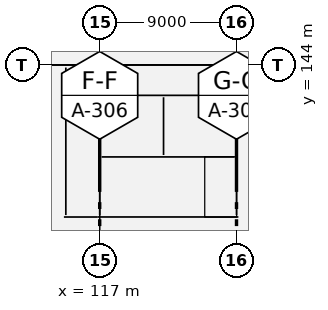
"""IFC4 building model, lengths in metres.
Left out: names, types, materials, properties, quantities, classifications, styles, units other than length and angle.
Written with IfcOpenShell. Run it as: python <this file> out.ifc"""

import sys

from ifc_helpers import new_model, si_unit, direction, frame, frame_2d, origin, origin_2d, place, context, subcontext, project, spatial, rectangle, extrude, element, fill, save


model = new_model("IFC4")
c1 = context("Model", 3, precision=1e-05, world=origin(), true_north=direction((0.0, 1.0)))
c2 = subcontext(c1, "Body", "Model", "MODEL_VIEW")
j1 = project(units=[si_unit("LENGTHUNIT", "METRE"), si_unit("PLANEANGLEUNIT", "RADIAN")], contexts=[c1])
p1 = place(None, origin())
s1 = spatial("IfcSite", under=j1, at=p1, CompositionType="ELEMENT")
p2 = place(p1, origin())
s2 = spatial("IfcBuilding", under=s1, at=p2, CompositionType="ELEMENT")
p3 = place(p2, origin())
s3 = spatial("IfcBuildingStorey", under=s2, at=p3, CompositionType="ELEMENT", Elevation=0.0)
for number, where, z_axis, x_axis in (
    (1, (117.0, 144.0, -0.5), (0.0, 0.0, 1.0), (1.0, 0.0, 0.0)),
    (2, (126.0, 144.0, -0.5), (0.0, 0.0, 1.0), (1.0, 0.0, 0.0)),
):
    element("IfcColumn", number, at=place(p3, frame(where, z_axis=z_axis, x_axis=x_axis)), inside=s3, PredefinedType="COLUMN", context=c2, shape_type="SweptSolid", body=[
        extrude(rectangle(XDim=0.8, YDim=0.7, at=origin_2d()), origin(), (0.0, 0.0, 1.0), 6.8),
    ])
p4 = place(p3, frame((108.4, 144.0, 0.0), z_axis=(0.0, 0.0, 1.0), x_axis=(1.0, 0.0, 0.0)))
e3 = element("IfcWall", 3, at=p4, inside=s3, PredefinedType="SOLIDWALL", context=c2, shape_type="SweptSolid", body=[
    extrude(rectangle(XDim=8.2, YDim=0.34, at=frame_2d((4.1, 0.0))), origin(), (0.0, 0.0, 1.0), 5.12),
])
p5 = place(p4, frame((2.9, 0.0, 0.0)))
e4 = element("IfcOpeningElement", 4, at=p5, cuts=e3, PredefinedType="OPENING", context=c2, shape_type="SweptSolid", body=[
    extrude(rectangle(XDim=2.4, YDim=3.1, at=frame_2d((1.2, 1.55))), frame((0.0, 0.18, 0.0), z_axis=(0.0, -1.0, 0.0), x_axis=(1.0, 0.0, 0.0)), (0.0, 0.0, 1.0), 0.36),
])
p6 = place(p4, frame((6.7, 0.0, 0.0)))
e5 = element("IfcOpeningElement", 5, at=p6, cuts=e3, PredefinedType="OPENING", context=c2, shape_type="SweptSolid", body=[
    extrude(rectangle(XDim=1.2, YDim=2.25, at=frame_2d((0.6, 1.125))), frame((0.0, 0.18, 0.0), z_axis=(0.0, -1.0, 0.0), x_axis=(1.0, 0.0, 0.0)), (0.0, 0.0, 1.0), 0.36),
])
p7 = place(p3, frame((117.4, 144.0, 0.0), z_axis=(0.0, 0.0, 1.0), x_axis=(1.0, 0.0, 0.0)))
e6 = element("IfcWall", 6, at=p7, inside=s3, PredefinedType="SOLIDWALL", context=c2, shape_type="SweptSolid", body=[
    extrude(rectangle(XDim=8.2, YDim=0.34, at=frame_2d((4.1, 0.0))), origin(), (0.0, 0.0, 1.0), 5.12),
])
p8 = place(p7, frame((1.533, 0.0, 0.9)))
e7 = element("IfcOpeningElement", 7, at=p8, cuts=e6, PredefinedType="OPENING", context=c2, shape_type="SweptSolid", body=[
    extrude(rectangle(XDim=2.4, YDim=3.5, at=frame_2d((1.2, 1.75))), frame((0.0, 0.18, 0.0), z_axis=(0.0, -1.0, 0.0), x_axis=(1.0, 0.0, 0.0)), (0.0, 0.0, 1.0), 0.36),
])
p9 = place(p7, frame((4.267, 0.0, 0.9)))
e8 = element("IfcOpeningElement", 8, at=p9, cuts=e6, PredefinedType="OPENING", context=c2, shape_type="SweptSolid", body=[
    extrude(rectangle(XDim=2.4, YDim=3.5, at=frame_2d((1.2, 1.75))), frame((0.0, 0.18, 0.0), z_axis=(0.0, -1.0, 0.0), x_axis=(1.0, 0.0, 0.0)), (0.0, 0.0, 1.0), 0.36),
])
p10 = place(p3, frame((126.4, 144.0, 0.0), z_axis=(0.0, 0.0, 1.0), x_axis=(1.0, 0.0, 0.0)))
e9 = element("IfcWall", 9, at=p10, inside=s3, PredefinedType="SOLIDWALL", context=c2, shape_type="SweptSolid", body=[
    extrude(rectangle(XDim=8.2, YDim=0.34, at=frame_2d((4.1, 0.0))), origin(), (0.0, 0.0, 1.0), 5.12),
])
p11 = place(p10, frame((2.9, 0.0, 0.0)))
e10 = element("IfcOpeningElement", 10, at=p11, cuts=e9, PredefinedType="OPENING", context=c2, shape_type="SweptSolid", body=[
    extrude(rectangle(XDim=2.4, YDim=3.1, at=frame_2d((1.2, 1.55))), frame((0.0, 0.18, 0.0), z_axis=(0.0, -1.0, 0.0), x_axis=(1.0, 0.0, 0.0)), (0.0, 0.0, 1.0), 0.36),
])
for number, where, z_axis, x_axis in (
    (11, (116.875, 134.0, -0.5), (0.0, 0.0, 1.0), (1.0, 0.0, 0.0)),
    (12, (116.875, 142.0, -0.5), (0.0, 0.0, 1.0), (1.0, 0.0, 0.0)),
):
    element("IfcWall", number, at=place(p3, frame(where, z_axis=z_axis, x_axis=x_axis)), inside=s3, PredefinedType="SOLIDWALL", context=c2, shape_type="SweptSolid", body=[
        extrude(rectangle(XDim=9.25, YDim=0.25, at=frame_2d((4.625, 0.0))), origin(), (0.0, 0.0, 1.0), 6.8),
    ])
p12 = place(p3, frame((117.0, 134.125, -0.5), z_axis=(0.0, 0.0, 1.0), x_axis=(0.0, 1.0, 0.0)))
e13 = element("IfcWall", 13, at=p12, inside=s3, PredefinedType="SOLIDWALL", context=c2, shape_type="SweptSolid", body=[
    extrude(rectangle(XDim=7.75, YDim=0.25, at=frame_2d((3.875, 0.0))), origin(), (0.0, 0.0, 1.0), 6.8),
])
p13 = place(p12, frame((1.15, 0.0, 0.5)))
e14 = element("IfcOpeningElement", 14, at=p13, cuts=e13, PredefinedType="OPENING", context=c2, shape_type="SweptSolid", body=[
    extrude(rectangle(XDim=1.2, YDim=2.2, at=frame_2d((0.6, 1.1))), frame((0.0, 0.135, 0.0), z_axis=(0.0, -1.0, 0.0), x_axis=(1.0, 0.0, 0.0)), (0.0, 0.0, 1.0), 0.27),
])
p14 = place(p3, frame((126.0, 134.125, -0.5), z_axis=(0.0, 0.0, 1.0), x_axis=(0.0, 1.0, 0.0)))
e15 = element("IfcWall", 15, at=p14, inside=s3, PredefinedType="SOLIDWALL", context=c2, shape_type="SweptSolid", body=[
    extrude(rectangle(XDim=7.75, YDim=0.25, at=frame_2d((3.875, 0.0))), origin(), (0.0, 0.0, 1.0), 6.8),
])
p15 = place(p14, frame((4.9, 0.0, 0.5)))
e16 = element("IfcOpeningElement", 16, at=p15, cuts=e15, PredefinedType="OPENING", context=c2, shape_type="SweptSolid", body=[
    extrude(rectangle(XDim=1.6, YDim=2.2, at=frame_2d((0.8, 1.1))), frame((0.0, 0.135, 0.0), z_axis=(0.0, -1.0, 0.0), x_axis=(1.0, 0.0, 0.0)), (0.0, 0.0, 1.0), 0.27),
])
p16 = place(p3, frame((117.125, 137.95, -0.5), z_axis=(0.0, 0.0, 1.0), x_axis=(1.0, 0.0, 0.0)))
e17 = element("IfcWall", 17, at=p16, inside=s3, PredefinedType="SOLIDWALL", context=c2, shape_type="SweptSolid", body=[
    extrude(rectangle(XDim=8.75, YDim=0.25, at=frame_2d((4.375, 0.0))), origin(), (0.0, 0.0, 1.0), 6.8),
])
p17 = place(p3, frame((121.2, 138.075, -0.5), z_axis=(0.0, 0.0, 1.0), x_axis=(0.0, 1.0, 0.0)))
e18 = element("IfcWall", 18, at=p17, inside=s3, PredefinedType="SOLIDWALL", context=c2, shape_type="SweptSolid", body=[
    extrude(rectangle(XDim=3.8, YDim=0.25, at=frame_2d((1.9, 0.0))), origin(), (0.0, 0.0, 1.0), 6.8),
])
p18 = place(p17, frame((1.35, 0.0, 0.5)))
e19 = element("IfcOpeningElement", 19, at=p18, cuts=e18, PredefinedType="OPENING", context=c2, shape_type="SweptSolid", body=[
    extrude(rectangle(XDim=1.1, YDim=2.2, at=frame_2d((0.55, 1.1))), frame((0.0, 0.135, 0.0), z_axis=(0.0, -1.0, 0.0), x_axis=(1.0, 0.0, 0.0)), (0.0, 0.0, 1.0), 0.27),
])
p19 = place(p3, frame((114.772, 134.125, 0.0), z_axis=(0.0, 0.0, 1.0), x_axis=(0.0, 1.0, 0.0)))
e20 = element("IfcWall", 20, at=p19, inside=s3, PredefinedType="STANDARD", context=c2, shape_type="SweptSolid", body=[
    extrude(rectangle(XDim=9.705, YDim=0.255, at=frame_2d((4.853, 0.0))), origin(), (0.0, 0.0, 1.0), 5.95),
])
p20 = place(p3, frame((117.002, 142.125, 0.0), z_axis=(0.0, 0.0, 1.0), x_axis=(0.0, 1.0, 0.0)))
e21 = element("IfcWall", 21, at=p20, inside=s3, PredefinedType="STANDARD", context=c2, shape_type="SweptSolid", body=[
    extrude(rectangle(XDim=1.525, YDim=0.255, at=frame_2d((0.762, 0.0))), origin(), (0.0, 0.0, 1.0), 4.97),
])
p21 = place(p3, frame((114.645, 133.998, 0.0), z_axis=(0.0, 0.0, 1.0), x_axis=(1.0, 0.0, 0.0)))
e22 = element("IfcWall", 22, at=p21, inside=s3, PredefinedType="STANDARD", context=c2, shape_type="SweptSolid", body=[
    extrude(rectangle(XDim=2.23, YDim=0.255, at=frame_2d((1.115, 0.0))), origin(), (0.0, 0.0, 1.0), 5.95),
])
p22 = place(p8, origin())
e23 = element("IfcWindow", 23, at=p22, inside=s3, PartitioningType="TRIPLE_PANEL_VERTICAL", PredefinedType="WINDOW", context=c2, shape_type="SweptSolid", body=[
    extrude(rectangle(XDim=2.4, YDim=3.5, at=frame_2d((1.2, 1.75))), frame((0.0, 0.03, 0.0), z_axis=(0.0, -1.0, 0.0), x_axis=(1.0, 0.0, 0.0)), (0.0, 0.0, 1.0), 0.06),
])
fill(e7, e23)
p23 = place(p9, origin())
e24 = element("IfcWindow", 24, at=p23, inside=s3, PartitioningType="TRIPLE_PANEL_VERTICAL", PredefinedType="WINDOW", context=c2, shape_type="SweptSolid", body=[
    extrude(rectangle(XDim=2.4, YDim=3.5, at=frame_2d((1.2, 1.75))), frame((0.0, 0.03, 0.0), z_axis=(0.0, -1.0, 0.0), x_axis=(1.0, 0.0, 0.0)), (0.0, 0.0, 1.0), 0.06),
])
fill(e8, e24)
p24 = place(p18, origin())
e25 = element("IfcDoor", 25, at=p24, inside=s3, OperationType="SLIDING_TO_LEFT", PredefinedType="DOOR", context=c2, shape_type="SweptSolid", body=[
    extrude(rectangle(XDim=1.1, YDim=2.2, at=frame_2d((0.55, 1.1))), frame((0.0, 0.025, 0.0), z_axis=(0.0, -1.0, 0.0), x_axis=(1.0, 0.0, 0.0)), (0.0, 0.0, 1.0), 0.05),
])
fill(e19, e25)
p25 = place(p13, origin())
e26 = element("IfcDoor", 26, at=p25, inside=s3, OperationType="SINGLE_SWING_LEFT", PredefinedType="DOOR", context=c2, shape_type="SweptSolid", body=[
    extrude(rectangle(XDim=1.2, YDim=2.2, at=frame_2d((0.6, 1.1))), frame((0.0, 0.025, 0.0), z_axis=(0.0, -1.0, 0.0), x_axis=(1.0, 0.0, 0.0)), (0.0, 0.0, 1.0), 0.05),
])
fill(e14, e26)
p26 = place(p15, origin())
e27 = element("IfcDoor", 27, at=p26, inside=s3, OperationType="SINGLE_SWING_RIGHT", PredefinedType="DOOR", context=c2, shape_type="SweptSolid", body=[
    extrude(rectangle(XDim=1.6, YDim=2.2, at=frame_2d((0.8, 1.1))), frame((0.0, 0.025, 0.0), z_axis=(0.0, -1.0, 0.0), x_axis=(1.0, 0.0, 0.0)), (0.0, 0.0, 1.0), 0.05),
])
fill(e16, e27)
p27 = place(p6, origin())
e28 = element("IfcDoor", 28, at=p27, inside=s3, OperationType="SINGLE_SWING_LEFT", PredefinedType="DOOR", context=c2, shape_type="SweptSolid", body=[
    extrude(rectangle(XDim=1.2, YDim=2.25, at=frame_2d((0.6, 1.125))), frame((0.0, 0.025, 0.0), z_axis=(0.0, -1.0, 0.0), x_axis=(1.0, 0.0, 0.0)), (0.0, 0.0, 1.0), 0.05),
])
fill(e5, e28)
save(model, sys.argv[1])
